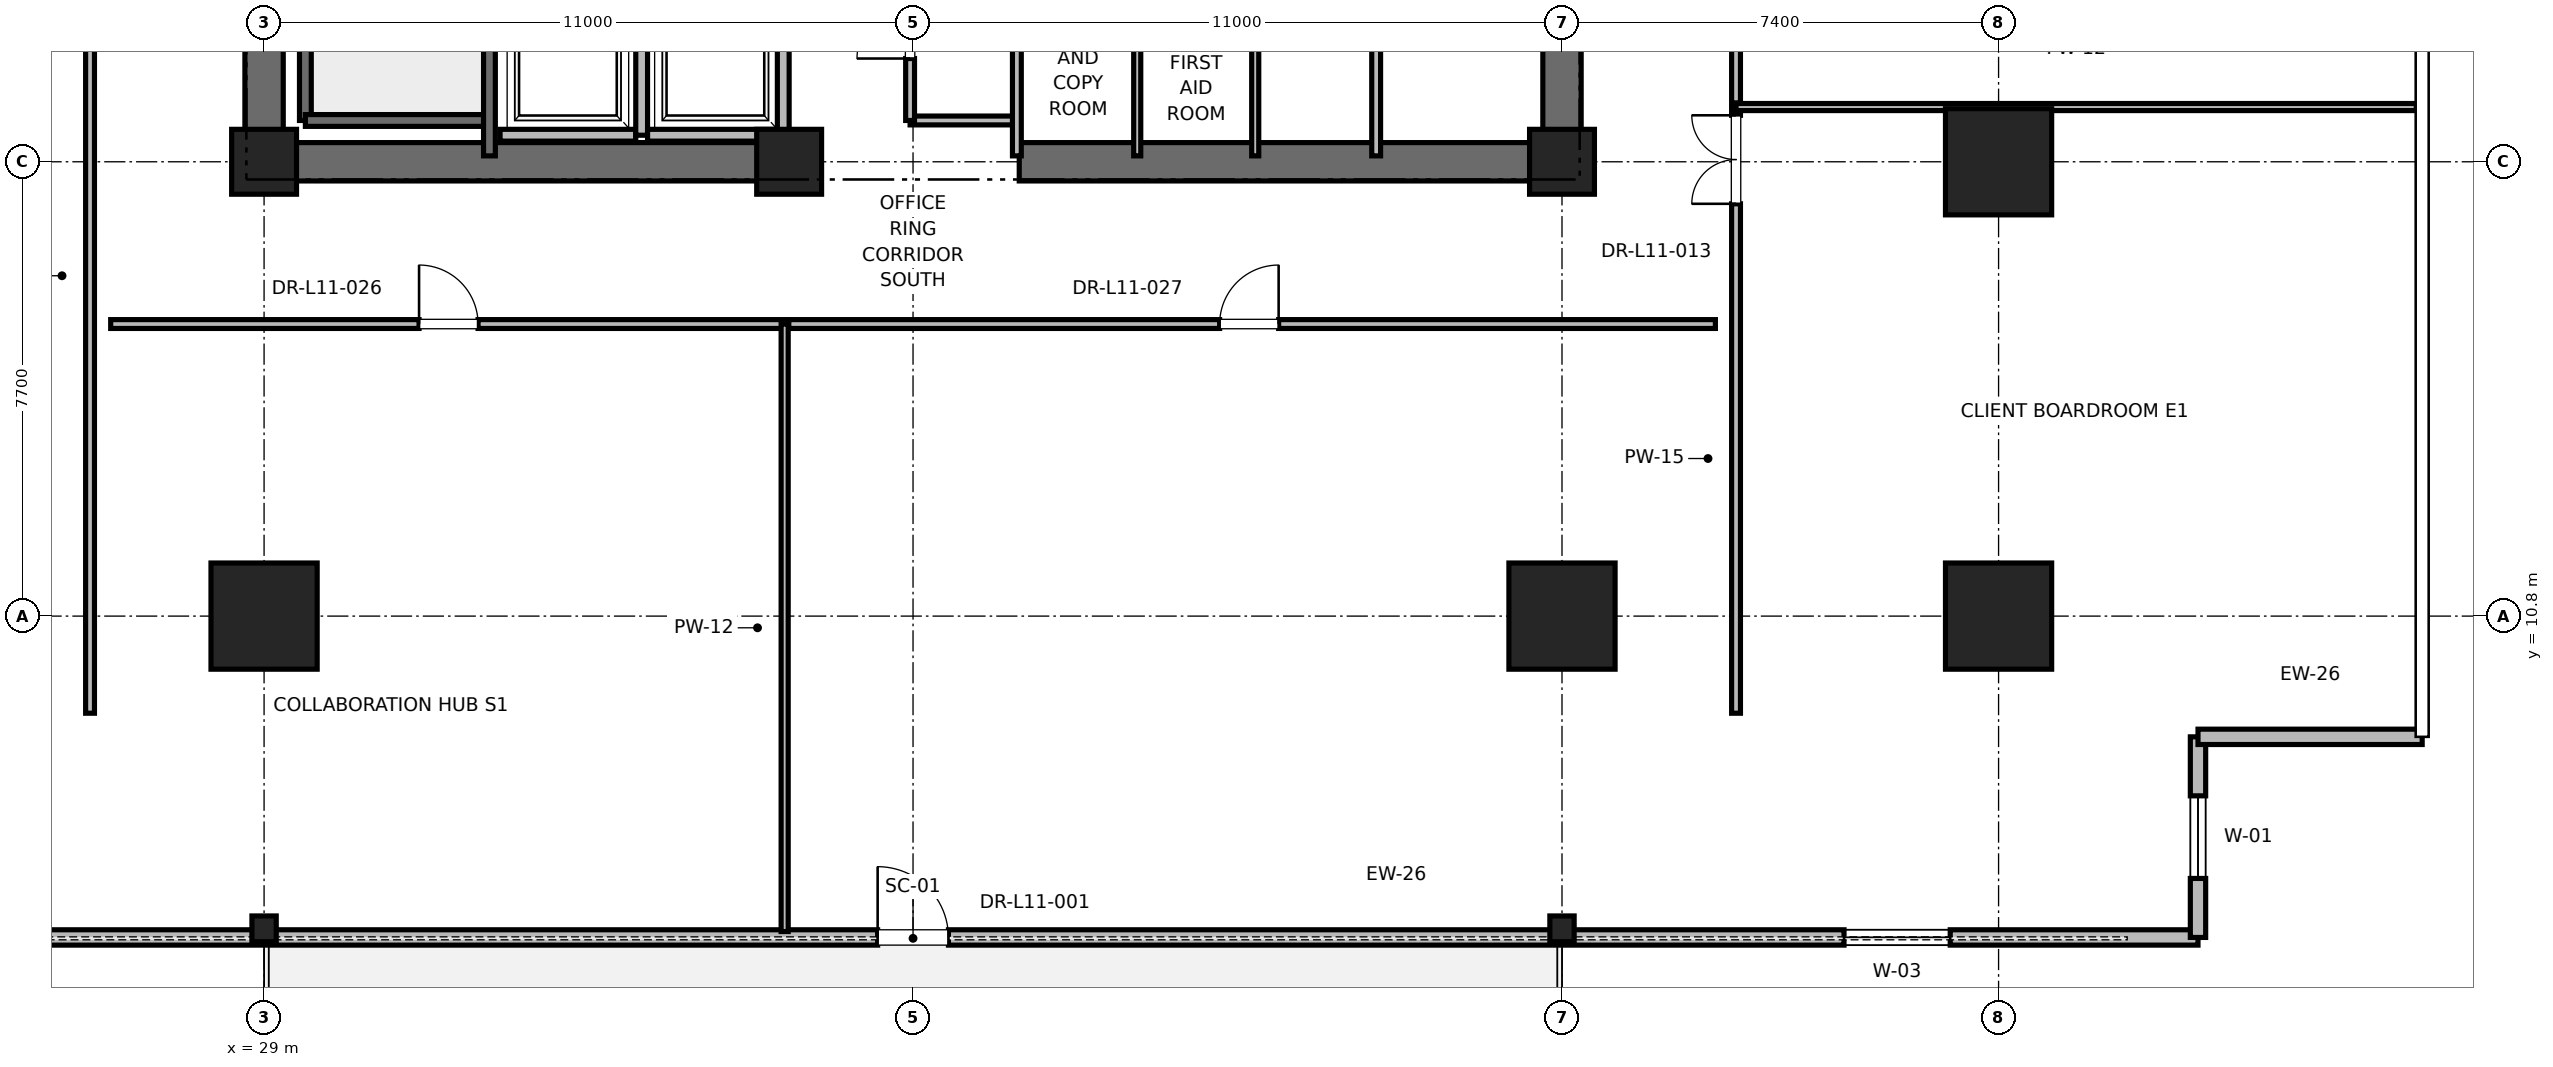
"""IFC4 building model, lengths in metres.
Left out: names, types, materials, properties, quantities, classifications, styles, units other than length and angle.
Written with IfcOpenShell. Run it as: python <this file> out.ifc"""

import sys

from ifc_helpers import new_model, si_unit, direction, frame, frame_2d, origin, origin_2d, place, context, subcontext, project, spatial, rectangle, i_section, extrude, element, fill, save


model = new_model("IFC4")
c1 = context("Model", 3, precision=1e-05, world=origin(), true_north=direction((0.0, 1.0)))
c2 = subcontext(c1, "Body", "Model", "MODEL_VIEW")
j1 = project(units=[si_unit("LENGTHUNIT", "METRE"), si_unit("PLANEANGLEUNIT", "RADIAN")], contexts=[c1])
p1 = place(None, origin())
s1 = spatial("IfcSite", under=j1, at=p1, CompositionType="ELEMENT")
p2 = place(p1, origin())
s2 = spatial("IfcBuilding", under=s1, at=p2, CompositionType="ELEMENT")
p3 = place(p2, frame((0.0, 0.0, 51.6)))
s3 = spatial("IfcBuildingStorey", under=s2, at=p3, CompositionType="ELEMENT", Elevation=51.6)
for number, where, z_axis, x_axis in (
    (1, (29.0, 10.8, 0.0), (0.0, 0.0, 1.0), (1.0, 0.0, 0.0)),
    (2, (51.0, 10.8, 0.0), (0.0, 0.0, 1.0), (1.0, 0.0, 0.0)),
    (3, (58.4, 18.5, 0.0), (0.0, 0.0, 1.0), (1.0, 0.0, 0.0)),
    (4, (58.4, 10.8, 0.0), (0.0, 0.0, 1.0), (1.0, 0.0, 0.0)),
):
    element("IfcColumn", number, at=place(p3, frame(where, z_axis=z_axis, x_axis=x_axis)), inside=s3, PredefinedType="COLUMN", context=c2, shape_type="SweptSolid", body=[
        extrude(rectangle(XDim=1.8, YDim=1.8, at=origin_2d()), origin(), (0.0, 0.0, 1.0), 4.0),
    ])
for number, where, z_axis, x_axis in (
    (5, (29.0, 5.5, 0.0), (0.0, 0.0, 1.0), (1.0, 0.0, 0.0)),
    (6, (51.0, 5.5, 0.0), (0.0, 0.0, 1.0), (1.0, 0.0, 0.0)),
):
    element("IfcColumn", number, at=place(p3, frame(where, z_axis=z_axis, x_axis=x_axis)), inside=s3, PredefinedType="COLUMN", context=c2, shape_type="SweptSolid", body=[
        extrude(i_section(OverallWidth=0.412, OverallDepth=0.437, WebThickness=0.036, FlangeThickness=0.058, FilletRadius=0.015, at=origin_2d()), origin(), (0.0, 0.0, 1.0), 4.0),
    ])
for number, where, z_axis, x_axis in (
    (7, (29.0, 18.5, 0.0), (0.0, 0.0, 1.0), (1.0, 0.0, 0.0)),
    (8, (51.0, 18.5, 0.0), (0.0, 0.0, 1.0), (1.0, 0.0, 0.0)),
    (9, (37.9, 18.5, 0.0), (0.0, 0.0, 1.0), (1.0, 0.0, 0.0)),
):
    element("IfcColumn", number, at=place(p3, frame(where, z_axis=z_axis, x_axis=x_axis)), inside=s3, PredefinedType="PILASTER", context=c2, shape_type="SweptSolid", body=[
        extrude(rectangle(XDim=1.1, YDim=1.1, at=origin_2d()), origin(), (0.0, 0.0, 1.0), 4.0),
    ])
for number, where, z_axis, x_axis in (
    (10, (29.0, 18.5, 0.0), (0.0, 0.0, 1.0), (1.0, 0.0, 0.0)),
    (11, (41.8, 18.5, 0.0), (0.0, 0.0, 1.0), (1.0, 0.0, 0.0)),
):
    element("IfcWall", number, at=place(p3, frame(where, z_axis=z_axis, x_axis=x_axis)), inside=s3, PredefinedType="SHEAR", context=c2, shape_type="SweptSolid", body=[
        extrude(rectangle(XDim=9.2, YDim=0.65, at=frame_2d((4.6, 0.0))), origin(), (0.0, 0.0, 1.0), 3.76),
    ])
p4 = place(p3, frame((29.0, 18.5, 0.0), z_axis=(0.0, 0.0, 1.0), x_axis=(0.0, 1.0, 0.0)))
e12 = element("IfcWall", 12, at=p4, inside=s3, PredefinedType="SHEAR", context=c2, shape_type="SweptSolid", body=[
    extrude(rectangle(XDim=8.8, YDim=0.65, at=frame_2d((4.4, 0.0))), origin(), (0.0, 0.0, 1.0), 3.76),
])
p5 = place(p3, frame((51.0, 18.5, 0.0), z_axis=(0.0, 0.0, 1.0), x_axis=(0.0, 1.0, 0.0)))
e13 = element("IfcWall", 13, at=p5, inside=s3, PredefinedType="SHEAR", context=c2, shape_type="SweptSolid", body=[
    extrude(rectangle(XDim=5.8, YDim=0.65, at=frame_2d((2.9, 0.0))), origin(), (0.0, 0.0, 1.0), 3.76),
])
p6 = place(p3, frame((18.22, 5.354, 0.0), z_axis=(0.0, 0.0, 1.0), x_axis=(1.0, 0.0, 0.0)))
e14 = element("IfcWall", 14, at=p6, inside=s3, PredefinedType="PARAPET", context=c2, shape_type="SweptSolid", body=[
    extrude(rectangle(XDim=43.561, YDim=0.26, at=frame_2d((21.78, 0.0))), origin(), (0.0, 0.0, 1.0), 2.889),
])
p7 = place(p6, frame((4.2, 0.0, 0.85)))
e15 = element("IfcOpeningElement", 15, at=p7, cuts=e14, PredefinedType="OPENING", context=c2, shape_type="SweptSolid", body=[
    extrude(rectangle(XDim=1.8, YDim=2.2, at=frame_2d((0.9, 1.1))), frame((0.0, 0.13, 0.0), z_axis=(0.0, -1.0, 0.0), x_axis=(1.0, 0.0, 0.0)), (0.0, 0.0, 1.0), 0.26),
])
p8 = place(p6, frame((21.18, 0.0, 0.0)))
e16 = element("IfcOpeningElement", 16, at=p8, cuts=e14, PredefinedType="OPENING", context=c2, shape_type="SweptSolid", body=[
    extrude(rectangle(XDim=1.2, YDim=2.2, at=frame_2d((0.6, 1.1))), frame((0.0, 0.13, 0.0), z_axis=(0.0, -1.0, 0.0), x_axis=(1.0, 0.0, 0.0)), (0.0, 0.0, 1.0), 0.26),
])
p9 = place(p6, frame((37.561, 0.0, 0.85)))
e17 = element("IfcOpeningElement", 17, at=p9, cuts=e14, PredefinedType="OPENING", context=c2, shape_type="SweptSolid", body=[
    extrude(rectangle(XDim=1.8, YDim=2.2, at=frame_2d((0.9, 1.1))), frame((0.0, 0.13, 0.0), z_axis=(0.0, -1.0, 0.0), x_axis=(1.0, 0.0, 0.0)), (0.0, 0.0, 1.0), 0.26),
])
p10 = place(p3, frame((61.78, 5.354, 0.0), z_axis=(0.0, 0.0, 1.0), x_axis=(0.0, 1.0, 0.0)))
e18 = element("IfcWall", 18, at=p10, inside=s3, PredefinedType="PARAPET", context=c2, shape_type="SweptSolid", body=[
    extrude(rectangle(XDim=3.4, YDim=0.26, at=frame_2d((1.7, 0.0))), origin(), (0.0, 0.0, 1.0), 3.76),
])
p11 = place(p10, frame((1.0, 0.0, 0.85)))
e19 = element("IfcOpeningElement", 19, at=p11, cuts=e18, PredefinedType="OPENING", context=c2, shape_type="SweptSolid", body=[
    extrude(rectangle(XDim=1.4, YDim=2.0, at=frame_2d((0.7, 1.0))), frame((0.0, 0.13, 0.0), z_axis=(0.0, -1.0, 0.0), x_axis=(1.0, 0.0, 0.0)), (0.0, 0.0, 1.0), 0.26),
])
p12 = place(p3, frame((61.78, 8.754, 0.0), z_axis=(0.0, 0.0, 1.0), x_axis=(1.0, 0.0, 0.0)))
e20 = element("IfcWall", 20, at=p12, inside=s3, PredefinedType="PARAPET", context=c2, shape_type="SweptSolid", body=[
    extrude(rectangle(XDim=3.8, YDim=0.26, at=frame_2d((1.9, 0.0))), origin(), (0.0, 0.0, 1.0), 3.76),
])
p13 = place(p3, frame((29.7, 19.2, 0.0), z_axis=(0.0, 0.0, 1.0), x_axis=(0.0, 1.0, 0.0)))
e21 = element("IfcWall", 21, at=p13, inside=s3, PredefinedType="SOLIDWALL", context=c2, shape_type="SweptSolid", body=[
    extrude(rectangle(XDim=8.15, YDim=0.2, at=frame_2d((4.075, 0.0))), origin(), (0.0, 0.0, 1.0), 3.76),
])
p14 = place(p3, frame((29.7, 19.2, 0.0), z_axis=(0.0, 0.0, 1.0), x_axis=(1.0, 0.0, 0.0)))
e22 = element("IfcWall", 22, at=p14, inside=s3, PredefinedType="SOLIDWALL", context=c2, shape_type="SweptSolid", body=[
    extrude(rectangle(XDim=3.12, YDim=0.2, at=frame_2d((1.56, 0.0))), origin(), (0.0, 0.0, 1.0), 3.76),
])
p15 = place(p3, frame((32.82, 18.6, 0.0), z_axis=(0.0, 0.0, 1.0), x_axis=(0.0, 1.0, 0.0)))
e23 = element("IfcWall", 23, at=p15, inside=s3, PredefinedType="SOLIDWALL", context=c2, shape_type="SweptSolid", body=[
    extrude(rectangle(XDim=8.78, YDim=0.2, at=frame_2d((4.39, 0.0))), origin(), (0.0, 0.0, 1.0), 3.76),
])
p16 = place(p3, frame((33.0, 18.95, 0.0), z_axis=(0.0, 0.0, 1.0), x_axis=(1.0, 0.0, 0.0)))
e24 = element("IfcWall", 24, at=p16, inside=s3, PredefinedType="SOLIDWALL", context=c2, shape_type="SweptSolid", body=[
    extrude(rectangle(XDim=2.3, YDim=0.2, at=frame_2d((1.15, 0.0))), origin(), (0.0, 0.0, 1.0), 3.76),
])
p17 = place(p3, frame((35.4, 18.95, 0.0), z_axis=(0.0, 0.0, 1.0), x_axis=(0.0, 1.0, 0.0)))
e25 = element("IfcWall", 25, at=p17, inside=s3, PredefinedType="SOLIDWALL", context=c2, shape_type="SweptSolid", body=[
    extrude(rectangle(XDim=2.6, YDim=0.2, at=frame_2d((1.3, 0.0))), origin(), (0.0, 0.0, 1.0), 3.76),
])
p18 = place(p3, frame((35.5, 18.95, 0.0), z_axis=(0.0, 0.0, 1.0), x_axis=(1.0, 0.0, 0.0)))
e26 = element("IfcWall", 26, at=p18, inside=s3, PredefinedType="SOLIDWALL", context=c2, shape_type="SweptSolid", body=[
    extrude(rectangle(XDim=2.3, YDim=0.2, at=frame_2d((1.15, 0.0))), origin(), (0.0, 0.0, 1.0), 2.54),
])
p19 = place(p3, frame((37.8, 18.95, 0.0), z_axis=(0.0, 0.0, 1.0), x_axis=(0.0, 1.0, 0.0)))
e27 = element("IfcWall", 27, at=p19, inside=s3, PredefinedType="SOLIDWALL", context=c2, shape_type="SweptSolid", body=[
    extrude(rectangle(XDim=2.6, YDim=0.2, at=frame_2d((1.3, 0.0))), origin(), (0.0, 0.0, 1.0), 2.54),
])
p20 = place(p3, frame((39.95, 19.2, 0.0), z_axis=(0.0, 0.0, 1.0), x_axis=(1.0, 0.0, 0.0)))
e28 = element("IfcWall", 28, at=p20, inside=s3, PredefinedType="PARTITIONING", context=c2, shape_type="SweptSolid", body=[
    extrude(rectangle(XDim=1.81, YDim=0.15, at=frame_2d((0.905, 0.0))), origin(), (0.0, 0.0, 1.0), 2.85),
])
p21 = place(p3, frame((41.76, 18.6, 0.0), z_axis=(0.0, 0.0, 1.0), x_axis=(0.0, 1.0, 0.0)))
e29 = element("IfcWall", 29, at=p21, inside=s3, PredefinedType="PARTITIONING", context=c2, shape_type="SweptSolid", body=[
    extrude(rectangle(XDim=3.6, YDim=0.15, at=frame_2d((1.8, 0.0))), origin(), (0.0, 0.0, 1.0), 2.54),
])
p22 = place(p3, frame((39.95, 19.2, 0.0), z_axis=(0.0, 0.0, 1.0), x_axis=(0.0, 1.0, 0.0)))
e30 = element("IfcWall", 30, at=p22, inside=s3, PredefinedType="PARTITIONING", context=c2, shape_type="SweptSolid", body=[
    extrude(rectangle(XDim=3.0, YDim=0.15, at=frame_2d((1.5, 0.0))), origin(), (0.0, 0.0, 1.0), 2.85),
])
p23 = place(p22, frame((1.05, 0.0, 0.0)))
e31 = element("IfcOpeningElement", 31, at=p23, cuts=e30, PredefinedType="OPENING", context=c2, shape_type="SweptSolid", body=[
    extrude(rectangle(XDim=0.9, YDim=2.1, at=frame_2d((0.45, 1.05))), frame((0.0, 0.075, 0.0), z_axis=(0.0, -1.0, 0.0), x_axis=(1.0, 0.0, 0.0)), (0.0, 0.0, 1.0), 0.15),
])
p24 = place(p3, frame((47.85, 18.6, 0.0), z_axis=(0.0, 0.0, 1.0), x_axis=(0.0, 1.0, 0.0)))
e32 = element("IfcWall", 32, at=p24, inside=s3, PredefinedType="PARTITIONING", context=c2, shape_type="SweptSolid", body=[
    extrude(rectangle(XDim=2.54, YDim=0.15, at=frame_2d((1.27, 0.0))), origin(), (0.0, 0.0, 1.0), 2.85),
])
for number, where, z_axis, x_axis in (
    (33, (43.8, 18.6, 0.0), (0.0, 0.0, 1.0), (0.0, 1.0, 0.0)),
    (34, (45.8, 18.6, 0.0), (0.0, 0.0, 1.0), (0.0, 1.0, 0.0)),
):
    element("IfcWall", number, at=place(p3, frame(where, z_axis=z_axis, x_axis=x_axis)), inside=s3, PredefinedType="PARTITIONING", context=c2, shape_type="SweptSolid", body=[
        extrude(rectangle(XDim=3.02, YDim=0.12, at=frame_2d((1.51, 0.0))), origin(), (0.0, 0.0, 1.0), 2.85),
    ])
p25 = place(p3, frame((26.4, 15.75, 0.0), z_axis=(0.0, 0.0, 1.0), x_axis=(1.0, 0.0, 0.0)))
e35 = element("IfcWall", 35, at=p25, inside=s3, PredefinedType="PARTITIONING", context=c2, shape_type="SweptSolid", body=[
    extrude(rectangle(XDim=11.424, YDim=0.15, at=frame_2d((5.712, 0.0))), origin(), (0.0, 0.0, 1.0), 2.85),
])
p26 = place(p25, frame((5.227, 0.0, 0.0)))
e36 = element("IfcOpeningElement", 36, at=p26, cuts=e35, PredefinedType="OPENING", context=c2, shape_type="SweptSolid", body=[
    extrude(rectangle(XDim=1.0, YDim=2.15, at=frame_2d((0.5, 1.075))), frame((0.0, 0.075, 0.0), z_axis=(0.0, -1.0, 0.0), x_axis=(1.0, 0.0, 0.0)), (0.0, 0.0, 1.0), 0.15),
])
p27 = place(p3, frame((37.824, 5.454, 0.0), z_axis=(0.0, 0.0, 1.0), x_axis=(0.0, 1.0, 0.0)))
e37 = element("IfcWall", 37, at=p27, inside=s3, PredefinedType="PARTITIONING", context=c2, shape_type="SweptSolid", body=[
    extrude(rectangle(XDim=10.296, YDim=0.12, at=frame_2d((5.148, 0.0))), origin(), (0.0, 0.0, 1.0), 2.39),
])
p28 = place(p3, frame((37.894, 15.75, 0.0), z_axis=(0.0, 0.0, 1.0), x_axis=(1.0, 0.0, 0.0)))
e38 = element("IfcWall", 38, at=p28, inside=s3, PredefinedType="PARTITIONING", context=c2, shape_type="SweptSolid", body=[
    extrude(rectangle(XDim=15.706, YDim=0.15, at=frame_2d((7.853, 0.0))), origin(), (0.0, 0.0, 1.0), 2.85),
])
p29 = place(p28, frame((7.303, 0.0, 0.0)))
e39 = element("IfcOpeningElement", 39, at=p29, cuts=e38, PredefinedType="OPENING", context=c2, shape_type="SweptSolid", body=[
    extrude(rectangle(XDim=1.0, YDim=2.15, at=frame_2d((0.5, 1.075))), frame((0.0, 0.075, 0.0), z_axis=(0.0, -1.0, 0.0), x_axis=(1.0, 0.0, 0.0)), (0.0, 0.0, 1.0), 0.15),
])
p30 = place(p3, frame((26.05, 9.154, 0.0), z_axis=(0.0, 0.0, 1.0), x_axis=(0.0, 1.0, 0.0)))
e40 = element("IfcWall", 40, at=p30, inside=s3, PredefinedType="PARTITIONING", context=c2, shape_type="SweptSolid", body=[
    extrude(rectangle(XDim=21.281, YDim=0.15, at=frame_2d((10.641, 0.0))), origin(), (0.0, 0.0, 1.0), 2.85),
])
p31 = place(p30, frame((14.829, 0.0, 0.0)))
e41 = element("IfcOpeningElement", 41, at=p31, cuts=e40, PredefinedType="OPENING", context=c2, shape_type="SweptSolid", body=[
    extrude(rectangle(XDim=1.0, YDim=2.15, at=frame_2d((0.5, 1.075))), frame((0.0, 0.075, 0.0), z_axis=(0.0, -1.0, 0.0), x_axis=(1.0, 0.0, 0.0)), (0.0, 0.0, 1.0), 0.15),
])
p32 = place(p3, frame((53.95, 9.154, 0.0), z_axis=(0.0, 0.0, 1.0), x_axis=(0.0, 1.0, 0.0)))
e42 = element("IfcWall", 42, at=p32, inside=s3, PredefinedType="PARTITIONING", context=c2, shape_type="SweptSolid", body=[
    extrude(rectangle(XDim=10.274, YDim=0.15, at=frame_2d((5.137, 0.0))), origin(), (0.0, 0.0, 1.0), 2.85),
])
p33 = place(p32, frame((8.634, 0.0, 0.0)))
e43 = element("IfcOpeningElement", 43, at=p33, cuts=e42, PredefinedType="OPENING", context=c2, shape_type="SweptSolid", body=[
    extrude(rectangle(XDim=1.5, YDim=2.25, at=frame_2d((0.75, 1.125))), frame((0.0, 0.075, 0.0), z_axis=(0.0, -1.0, 0.0), x_axis=(1.0, 0.0, 0.0)), (0.0, 0.0, 1.0), 0.15),
])
p34 = place(p3, frame((53.95, 19.428, 0.0), z_axis=(0.0, 0.0, 1.0), x_axis=(1.0, 0.0, 0.0)))
e44 = element("IfcWall", 44, at=p34, inside=s3, PredefinedType="PARTITIONING", context=c2, shape_type="SweptSolid", body=[
    extrude(rectangle(XDim=11.53, YDim=0.12, at=frame_2d((5.765, 0.0))), origin(), (0.0, 0.0, 1.0), 2.85),
])
p35 = place(p3, frame((53.95, 19.498, 0.0), z_axis=(0.0, 0.0, 1.0), x_axis=(0.0, 1.0, 0.0)))
e45 = element("IfcWall", 45, at=p35, inside=s3, PredefinedType="PARTITIONING", context=c2, shape_type="SweptSolid", body=[
    extrude(rectangle(XDim=12.405, YDim=0.15, at=frame_2d((6.203, 0.0))), origin(), (0.0, 0.0, 1.0), 2.85),
])
p36 = place(p35, frame((5.668, 0.0, 0.0)))
e46 = element("IfcOpeningElement", 46, at=p36, cuts=e45, PredefinedType="OPENING", context=c2, shape_type="SweptSolid", body=[
    extrude(rectangle(XDim=1.0, YDim=2.15, at=frame_2d((0.5, 1.075))), frame((0.0, 0.075, 0.0), z_axis=(0.0, -1.0, 0.0), x_axis=(1.0, 0.0, 0.0)), (0.0, 0.0, 1.0), 0.15),
])
p37 = place(p8, origin())
e47 = element("IfcDoor", 47, at=p37, inside=s3, OperationType="SINGLE_SWING_LEFT", PredefinedType="DOOR", context=c2, shape_type="SweptSolid", body=[
    extrude(rectangle(XDim=1.2, YDim=2.2, at=frame_2d((0.6, 1.1))), frame((0.0, 0.025, 0.0), z_axis=(0.0, -1.0, 0.0), x_axis=(1.0, 0.0, 0.0)), (0.0, 0.0, 1.0), 0.05),
])
fill(e16, e47)
p38 = place(p9, origin())
e48 = element("IfcWindow", 48, at=p38, inside=s3, PartitioningType="SINGLE_PANEL", PredefinedType="WINDOW", context=c2, shape_type="SweptSolid", body=[
    extrude(rectangle(XDim=1.8, YDim=2.2, at=frame_2d((0.9, 1.1))), frame((0.0, 0.03, 0.0), z_axis=(0.0, -1.0, 0.0), x_axis=(1.0, 0.0, 0.0)), (0.0, 0.0, 1.0), 0.06),
])
fill(e17, e48)
p39 = place(p11, origin())
e49 = element("IfcWindow", 49, at=p39, inside=s3, PartitioningType="SINGLE_PANEL", PredefinedType="WINDOW", context=c2, shape_type="SweptSolid", body=[
    extrude(rectangle(XDim=1.4, YDim=2.0, at=frame_2d((0.7, 1.0))), frame((0.0, 0.03, 0.0), z_axis=(0.0, -1.0, 0.0), x_axis=(1.0, 0.0, 0.0)), (0.0, 0.0, 1.0), 0.06),
])
fill(e19, e49)
p40 = place(p23, origin())
e50 = element("IfcDoor", 50, at=p40, inside=s3, OperationType="SINGLE_SWING_LEFT", PredefinedType="DOOR", context=c2, shape_type="SweptSolid", body=[
    extrude(rectangle(XDim=0.9, YDim=2.1, at=frame_2d((0.45, 1.05))), frame((0.0, 0.025, 0.0), z_axis=(0.0, -1.0, 0.0), x_axis=(1.0, 0.0, 0.0)), (0.0, 0.0, 1.0), 0.05),
])
fill(e31, e50)
p41 = place(p26, origin())
e51 = element("IfcDoor", 51, at=p41, inside=s3, OperationType="SINGLE_SWING_LEFT", PredefinedType="DOOR", context=c2, shape_type="SweptSolid", body=[
    extrude(rectangle(XDim=1.0, YDim=2.15, at=frame_2d((0.5, 1.075))), frame((0.0, 0.025, 0.0), z_axis=(0.0, -1.0, 0.0), x_axis=(1.0, 0.0, 0.0)), (0.0, 0.0, 1.0), 0.05),
])
fill(e36, e51)
p42 = place(p29, origin())
e52 = element("IfcDoor", 52, at=p42, inside=s3, OperationType="SINGLE_SWING_RIGHT", PredefinedType="DOOR", context=c2, shape_type="SweptSolid", body=[
    extrude(rectangle(XDim=1.0, YDim=2.15, at=frame_2d((0.5, 1.075))), frame((0.0, 0.025, 0.0), z_axis=(0.0, -1.0, 0.0), x_axis=(1.0, 0.0, 0.0)), (0.0, 0.0, 1.0), 0.05),
])
fill(e39, e52)
p43 = place(p33, origin())
e53 = element("IfcDoor", 53, at=p43, inside=s3, OperationType="DOUBLE_DOOR_SINGLE_SWING", PredefinedType="DOOR", context=c2, shape_type="SweptSolid", body=[
    extrude(rectangle(XDim=1.5, YDim=2.25, at=frame_2d((0.75, 1.125))), frame((0.0, 0.025, 0.0), z_axis=(0.0, -1.0, 0.0), x_axis=(1.0, 0.0, 0.0)), (0.0, 0.0, 1.0), 0.05),
])
fill(e43, e53)
save(model, sys.argv[1])
